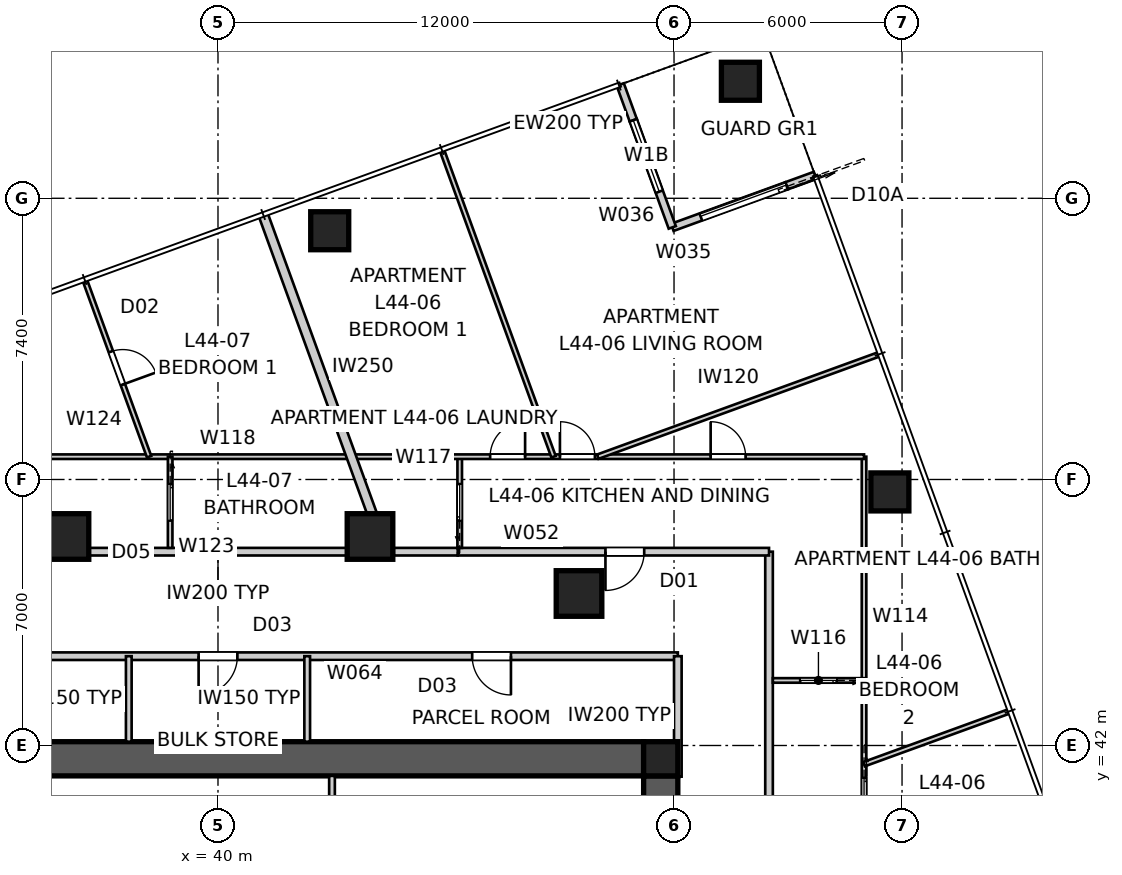
"""IFC4 building model, lengths in metres.
Left out: names, types, materials, properties, quantities, classifications, styles, units other than length and angle.
Written with IfcOpenShell. Run it as: python <this file> out.ifc"""

import sys

from ifc_helpers import new_model, si_unit, direction, frame, frame_2d, origin, origin_2d, place, context, subcontext, project, spatial, polyline, rectangle, outline, extrude, element, fill, save


model = new_model("IFC4")
c1 = context("Model", 3, precision=1e-05, world=origin(), true_north=direction((0.0, 1.0)))
c2 = subcontext(c1, "Body", "Model", "MODEL_VIEW")
j1 = project(units=[si_unit("LENGTHUNIT", "METRE"), si_unit("PLANEANGLEUNIT", "RADIAN")], contexts=[c1])
p1 = place(None, origin())
s1 = spatial("IfcSite", under=j1, at=p1, CompositionType="ELEMENT")
p2 = place(p1, origin())
s2 = spatial("IfcBuilding", under=s1, at=p2, CompositionType="ELEMENT")
p3 = place(p2, frame((0.0, 0.0, 160.8)))
s3 = spatial("IfcBuildingStorey", under=s2, at=p3, CompositionType="ELEMENT", Elevation=160.8)
p4 = place(p3, frame((28.8, 41.65, 0.0), z_axis=(0.0, 0.0, 1.0), x_axis=(1.0, 0.0, 0.0)))
e1 = element("IfcWall", 1, at=p4, inside=s3, PredefinedType="SHEAR", context=c2, shape_type="SweptSolid", body=[
    extrude(outline(polyline([(0.0, -0.45), (22.4, -0.45), (22.4, -0.025), (22.85, -0.025), (22.85, 0.025), (22.4, 0.025), (22.4, 0.45), (0.0, 0.45), (0.0, 0.025), (-0.45, 0.025), (-0.45, -0.025), (0.0, -0.025), (0.0, -0.45)])), origin(), (0.0, 0.0, 1.0), 3.4),
])
p5 = place(p3, frame((51.65, 18.8, 0.0), z_axis=(0.0, 0.0, 1.0), x_axis=(0.0, 1.0, 0.0)))
e2 = element("IfcWall", 2, at=p5, inside=s3, PredefinedType="SHEAR", context=c2, shape_type="SweptSolid", body=[
    extrude(outline(polyline([(0.0, -0.45), (22.4, -0.45), (22.4, -0.025), (22.85, -0.025), (22.85, 0.025), (22.4, 0.025), (22.4, 0.45), (0.0, 0.45), (0.0, 0.025), (-0.45, 0.025), (-0.45, -0.025), (0.0, -0.025), (0.0, -0.45)])), origin(), (0.0, 0.0, 1.0), 3.4),
])
p6 = place(p5, frame((11.14, 0.0, 0.0)))
e3 = element("IfcOpeningElement", 3, at=p6, cuts=e2, PredefinedType="OPENING", context=c2, shape_type="SweptSolid", body=[
    extrude(rectangle(XDim=1.02, YDim=2.4, at=frame_2d((0.51, 1.2))), frame((0.0, 0.46, 0.0), z_axis=(0.0, -1.0, 0.0), x_axis=(1.0, 0.0, 0.0)), (0.0, 0.0, 1.0), 0.92),
])
p7 = place(p3, frame((51.65, 41.65, 0.0), z_axis=(0.0, 0.0, 1.0), x_axis=(1.0, 0.0, 0.0)))
e4 = element("IfcColumn", 4, at=p7, inside=s3, PredefinedType="COLUMN", context=c2, shape_type="SweptSolid", body=[
    extrude(rectangle(XDim=0.9, YDim=0.9, at=origin_2d()), origin(), (0.0, 0.0, 1.0), 3.4),
])
for number, where, z_axis, x_axis in (
    (5, (57.68, 48.673, 0.0), (0.0, 0.0, 1.0), (1.0, 0.0, 0.0)),
    (6, (53.747, 59.479, 0.0), (0.0, 0.0, 1.0), (1.0, 0.0, 0.0)),
    (7, (42.94, 55.546, 0.0), (0.0, 0.0, 1.0), (1.0, 0.0, 0.0)),
):
    element("IfcColumn", number, at=place(p3, frame(where, z_axis=z_axis, x_axis=x_axis)), inside=s3, PredefinedType="COLUMN", context=c2, shape_type="SweptSolid", body=[
        extrude(rectangle(XDim=1.0, YDim=1.0, at=origin_2d()), origin(), (0.0, 0.0, 1.0), 3.4),
    ])
for number, where, z_axis, x_axis in (
    (8, (49.5, 46.0, 0.0), (0.0, 0.0, 1.0), (1.0, 0.0, 0.0)),
    (9, (44.0, 47.5, 0.0), (0.0, 0.0, 1.0), (1.0, 0.0, 0.0)),
    (10, (36.0, 47.5, 0.0), (0.0, 0.0, 1.0), (1.0, 0.0, 0.0)),
):
    element("IfcColumn", number, at=place(p3, frame(where, z_axis=z_axis, x_axis=x_axis)), inside=s3, PredefinedType="COLUMN", context=c2, shape_type="SweptSolid", body=[
        extrude(rectangle(XDim=1.2, YDim=1.2, at=origin_2d()), origin(), (0.0, 0.0, 1.0), 3.4),
    ])
p8 = place(p3, frame((55.712, 57.002, 0.0), z_axis=(0.0, 0.0, 1.0), x_axis=(-0.939659694648, -0.342110593602, 0.0)))
e11 = element("IfcWall", 11, at=p8, inside=s3, PredefinedType="SOLIDWALL", context=c2, shape_type="SweptSolid", body=[
    extrude(rectangle(XDim=0.8, YDim=0.2, at=frame_2d((0.4, 0.0))), origin(), (0.0, 0.0, 1.0), 3.25),
])
p9 = place(p3, frame((54.96, 56.729, 0.0), z_axis=(0.0, 0.0, 1.0), x_axis=(-0.939693144909, -0.342018703306, 0.0)))
e12 = element("IfcWall", 12, at=p9, inside=s3, PredefinedType="SOLIDWALL", context=c2, shape_type="SweptSolid", body=[
    extrude(rectangle(XDim=3.2, YDim=0.2, at=frame_2d((1.6, 0.0))), origin(), (0.0, 0.0, 1.0), 2.722),
])
p10 = place(p9, origin())
e13 = element("IfcOpeningElement", 13, at=p10, cuts=e12, PredefinedType="OPENING", context=c2, shape_type="SweptSolid", body=[
    extrude(rectangle(XDim=2.4, YDim=2.1, at=frame_2d((1.2, 1.05))), frame((0.0, 0.11, 0.0), z_axis=(0.0, -1.0, 0.0), x_axis=(1.0, 0.0, 0.0)), (0.0, 0.0, 1.0), 0.22),
])
p11 = place(p3, frame((51.953, 55.634, 0.0), z_axis=(0.0, 0.0, 1.0), x_axis=(-0.341965219194, 0.939712609717, 0.0)))
e14 = element("IfcWall", 14, at=p11, inside=s3, PredefinedType="SOLIDWALL", context=c2, shape_type="SweptSolid", body=[
    extrude(rectangle(XDim=3.0, YDim=0.2, at=frame_2d((1.5, 0.0))), origin(), (0.0, 0.0, 1.0), 2.722),
])
p12 = place(p11, frame((1.0, 0.0, 0.45)))
e15 = element("IfcOpeningElement", 15, at=p12, cuts=e14, PredefinedType="OPENING", context=c2, shape_type="SweptSolid", body=[
    extrude(rectangle(XDim=2.0, YDim=1.8, at=frame_2d((1.0, 0.9))), frame((0.0, 0.11, 0.0), z_axis=(0.0, -1.0, 0.0), x_axis=(1.0, 0.0, 0.0)), (0.0, 0.0, 1.0), 0.22),
])
p13 = place(p3, frame((50.927, 58.453, 0.0), z_axis=(0.0, 0.0, 1.0), x_axis=(-0.342037080957, 0.939686455819, 0.0)))
e16 = element("IfcWall", 16, at=p13, inside=s3, PredefinedType="SOLIDWALL", context=c2, shape_type="SweptSolid", body=[
    extrude(rectangle(XDim=1.0, YDim=0.2, at=frame_2d((0.5, 0.0))), origin(), (0.0, 0.0, 1.0), 3.25),
])
p14 = place(p3, frame((54.5, 13.7, 0.0), z_axis=(0.0, 0.0, 1.0), x_axis=(0.0, 1.0, 0.0)))
e17 = element("IfcWall", 17, at=p14, inside=s3, PredefinedType="PARTITIONING", context=c2, shape_type="SweptSolid", body=[
    extrude(rectangle(XDim=33.4, YDim=0.2, at=frame_2d((16.7, 0.0))), origin(), (0.0, 0.0, 1.0), 3.25),
])
p15 = place(p14, frame((5.028, 0.0, 0.0)))
e18 = element("IfcOpeningElement", 18, at=p15, cuts=e17, PredefinedType="OPENING", context=c2, shape_type="SweptSolid", body=[
    extrude(rectangle(XDim=1.02, YDim=2.1, at=frame_2d((0.51, 1.05))), frame((0.0, 0.11, 0.0), z_axis=(0.0, -1.0, 0.0), x_axis=(1.0, 0.0, 0.0)), (0.0, 0.0, 1.0), 0.22),
])
p16 = place(p14, frame((13.587, 0.0, 0.0)))
e19 = element("IfcOpeningElement", 19, at=p16, cuts=e17, PredefinedType="OPENING", context=c2, shape_type="SweptSolid", body=[
    extrude(rectangle(XDim=1.02, YDim=2.34, at=frame_2d((0.51, 1.17))), frame((0.0, 0.11, 0.0), z_axis=(0.0, -1.0, 0.0), x_axis=(1.0, 0.0, 0.0)), (0.0, 0.0, 1.0), 0.22),
])
p17 = place(p3, frame((54.5, 47.1, 0.0), z_axis=(0.0, 0.0, 1.0), x_axis=(-1.0, 0.0, 0.0)))
e20 = element("IfcWall", 20, at=p17, inside=s3, PredefinedType="PARTITIONING", context=c2, shape_type="SweptSolid", body=[
    extrude(rectangle(XDim=8.192, YDim=0.2, at=frame_2d((4.096, 0.0))), origin(), (0.0, 0.0, 1.0), 3.25),
])
p18 = place(p17, frame((3.285, 0.0, 0.0)))
e21 = element("IfcOpeningElement", 21, at=p18, cuts=e20, PredefinedType="OPENING", context=c2, shape_type="SweptSolid", body=[
    extrude(rectangle(XDim=1.02, YDim=2.34, at=frame_2d((0.51, 1.17))), frame((0.0, 0.11, 0.0), z_axis=(0.0, -1.0, 0.0), x_axis=(1.0, 0.0, 0.0)), (0.0, 0.0, 1.0), 0.22),
])
p19 = place(p3, frame((46.308, 47.1, 0.0), z_axis=(0.0, 0.0, 1.0), x_axis=(-1.0, 0.0, 0.0)))
e22 = element("IfcWall", 22, at=p19, inside=s3, PredefinedType="PARTITIONING", context=c2, shape_type="SweptSolid", body=[
    extrude(rectangle(XDim=1.683, YDim=0.2, at=frame_2d((0.842, 0.0))), origin(), (0.0, 0.0, 1.0), 2.55),
])
p20 = place(p3, frame((44.625, 47.1, 0.0), z_axis=(0.0, 0.0, 1.0), x_axis=(-1.0, 0.0, 0.0)))
e23 = element("IfcWall", 23, at=p20, inside=s3, PredefinedType="PARTITIONING", context=c2, shape_type="SweptSolid", body=[
    extrude(rectangle(XDim=9.25, YDim=0.2, at=frame_2d((4.625, 0.0))), origin(), (0.0, 0.0, 1.0), 3.25),
])
p21 = place(p3, frame((41.188, 55.973, 0.0), z_axis=(0.0, 0.0, 1.0), x_axis=(0.342014066156, -0.939694832673, 0.0)))
e24 = element("IfcWall", 24, at=p21, inside=s3, PredefinedType="PARTITIONING", context=c2, shape_type="SweptSolid", body=[
    extrude(rectangle(XDim=9.331, YDim=0.25, at=frame_2d((4.665, 0.0))), origin(), (0.0, 0.0, 1.0), 3.25),
])
p22 = place(p3, frame((43.0, 41.2, 0.0), z_axis=(0.0, 0.0, 1.0), x_axis=(0.0, -1.0, 0.0)))
e25 = element("IfcWall", 25, at=p22, inside=s3, PredefinedType="SOLIDWALL", context=c2, shape_type="SweptSolid", body=[
    extrude(rectangle(XDim=5.9, YDim=0.15, at=frame_2d((2.95, 0.0))), origin(), (0.0, 0.0, 1.0), 3.25),
])
p23 = place(p3, frame((52.1, 44.35, 0.0), z_axis=(0.0, 0.0, 1.0), x_axis=(-1.0, 0.0, 0.0)))
e26 = element("IfcWall", 26, at=p23, inside=s3, PredefinedType="PARTITIONING", context=c2, shape_type="SweptSolid", body=[
    extrude(rectangle(XDim=24.2, YDim=0.2, at=frame_2d((12.1, 0.0))), origin(), (0.0, 0.0, 1.0), 3.25),
])
p24 = place(p23, frame((18.789, 0.0, 0.0)))
e27 = element("IfcOpeningElement", 27, at=p24, cuts=e26, PredefinedType="OPENING", context=c2, shape_type="SweptSolid", body=[
    extrude(rectangle(XDim=1.02, YDim=2.1, at=frame_2d((0.51, 1.05))), frame((0.0, 0.11, 0.0), z_axis=(0.0, -1.0, 0.0), x_axis=(1.0, 0.0, 0.0)), (0.0, 0.0, 1.0), 0.22),
])
p25 = place(p23, frame((4.391, 0.0, 0.0)))
e28 = element("IfcOpeningElement", 28, at=p25, cuts=e26, PredefinedType="OPENING", context=c2, shape_type="SweptSolid", body=[
    extrude(rectangle(XDim=1.02, YDim=2.1, at=frame_2d((0.51, 1.05))), frame((0.0, 0.11, 0.0), z_axis=(0.0, -1.0, 0.0), x_axis=(1.0, 0.0, 0.0)), (0.0, 0.0, 1.0), 0.22),
])
p26 = place(p23, frame((11.59, 0.0, 0.0)))
e29 = element("IfcOpeningElement", 29, at=p26, cuts=e26, PredefinedType="OPENING", context=c2, shape_type="SweptSolid", body=[
    extrude(rectangle(XDim=1.02, YDim=2.1, at=frame_2d((0.51, 1.05))), frame((0.0, 0.11, 0.0), z_axis=(0.0, -1.0, 0.0), x_axis=(1.0, 0.0, 0.0)), (0.0, 0.0, 1.0), 0.22),
])
p27 = place(p3, frame((52.1, 41.18, 0.0), z_axis=(0.0, 0.0, 1.0), x_axis=(0.0, 1.0, 0.0)))
e30 = element("IfcWall", 30, at=p27, inside=s3, PredefinedType="PARTITIONING", context=c2, shape_type="SweptSolid", body=[
    extrude(rectangle(XDim=3.17, YDim=0.2, at=frame_2d((1.585, 0.0))), origin(), (0.0, 0.0, 1.0), 3.25),
])
for number, where, z_axis, x_axis in (
    (31, (37.653, 42.1, 0.0), (0.0, 0.0, 1.0), (0.0, 1.0, 0.0)),
    (32, (42.347, 42.1, 0.0), (0.0, 0.0, 1.0), (0.0, 1.0, 0.0)),
):
    element("IfcWall", number, at=place(p3, frame(where, z_axis=z_axis, x_axis=x_axis)), inside=s3, PredefinedType="SOLIDWALL", context=c2, shape_type="SweptSolid", body=[
        extrude(rectangle(XDim=2.25, YDim=0.15, at=frame_2d((1.125, 0.0))), origin(), (0.0, 0.0, 1.0), 3.25),
    ])
p28 = place(p3, frame((57.0, 49.6, 0.0), z_axis=(0.0, 0.0, 1.0), x_axis=(0.0, -1.0, 0.0)))
e33 = element("IfcWall", 33, at=p28, inside=s3, PredefinedType="PARTITIONING", context=c2, shape_type="SweptSolid", body=[
    extrude(rectangle(XDim=18.589, YDim=0.12, at=frame_2d((9.294, 0.0))), origin(), (0.0, 0.0, 1.0), 2.55),
])
p29 = place(p28, frame((8.452, 0.0, 0.0)))
e34 = element("IfcOpeningElement", 34, at=p29, cuts=e33, PredefinedType="OPENING", context=c2, shape_type="SweptSolid", body=[
    extrude(rectangle(XDim=0.96, YDim=2.1, at=frame_2d((0.48, 1.05))), frame((0.0, 0.07, 0.0), z_axis=(0.0, -1.0, 0.0), x_axis=(1.0, 0.0, 0.0)), (0.0, 0.0, 1.0), 0.14),
])
p30 = place(p28, frame((11.889, 0.0, 0.0)))
e35 = element("IfcOpeningElement", 35, at=p30, cuts=e33, PredefinedType="OPENING", context=c2, shape_type="SweptSolid", body=[
    extrude(rectangle(XDim=0.96, YDim=2.1, at=frame_2d((0.48, 1.05))), frame((0.0, 0.07, 0.0), z_axis=(0.0, -1.0, 0.0), x_axis=(1.0, 0.0, 0.0)), (0.0, 0.0, 1.0), 0.14),
])
p31 = place(p3, frame((57.0, 43.712, 0.0), z_axis=(0.0, 0.0, 1.0), x_axis=(-1.0, 0.0, 0.0)))
e36 = element("IfcWall", 36, at=p31, inside=s3, PredefinedType="PARTITIONING", context=c2, shape_type="SweptSolid", body=[
    extrude(rectangle(XDim=2.4, YDim=0.12, at=frame_2d((1.2, 0.0))), origin(), (0.0, 0.0, 1.0), 3.25),
])
p32 = place(p31, frame((0.72, 0.0, 0.0)))
e37 = element("IfcOpeningElement", 37, at=p32, cuts=e36, PredefinedType="OPENING", context=c2, shape_type="SweptSolid", body=[
    extrude(rectangle(XDim=0.96, YDim=2.1, at=frame_2d((0.48, 1.05))), frame((0.0, 0.07, 0.0), z_axis=(0.0, -1.0, 0.0), x_axis=(1.0, 0.0, 0.0)), (0.0, 0.0, 1.0), 0.14),
])
p33 = place(p3, frame((46.361, 47.2, 0.0), z_axis=(0.0, 0.0, 1.0), x_axis=(0.0, 1.0, 0.0)))
e38 = element("IfcWall", 38, at=p33, inside=s3, PredefinedType="PARTITIONING", context=c2, shape_type="SweptSolid", body=[
    extrude(rectangle(XDim=2.4, YDim=0.12, at=frame_2d((1.2, 0.0))), origin(), (0.0, 0.0, 1.0), 3.25),
])
p34 = place(p33, frame((0.72, 0.0, 0.0)))
e39 = element("IfcOpeningElement", 39, at=p34, cuts=e38, PredefinedType="OPENING", context=c2, shape_type="SweptSolid", body=[
    extrude(rectangle(XDim=0.96, YDim=2.1, at=frame_2d((0.48, 1.05))), frame((0.0, 0.07, 0.0), z_axis=(0.0, -1.0, 0.0), x_axis=(1.0, 0.0, 0.0)), (0.0, 0.0, 1.0), 0.14),
])
p35 = place(p3, frame((27.545, 49.6, 0.0), z_axis=(0.0, 0.0, 1.0), x_axis=(1.0, 0.0, 0.0)))
e40 = element("IfcWall", 40, at=p35, inside=s3, PredefinedType="PARTITIONING", context=c2, shape_type="SweptSolid", body=[
    extrude(rectangle(XDim=29.455, YDim=0.12, at=frame_2d((14.727, 0.0))), origin(), (0.0, 0.0, 1.0), 3.25),
])
p36 = place(p35, frame((4.887, 0.0, 0.0)))
e41 = element("IfcOpeningElement", 41, at=p36, cuts=e40, PredefinedType="OPENING", context=c2, shape_type="SweptSolid", body=[
    extrude(rectangle(XDim=0.92, YDim=2.34, at=frame_2d((0.46, 1.17))), frame((0.0, 0.07, 0.0), z_axis=(0.0, -1.0, 0.0), x_axis=(1.0, 0.0, 0.0)), (0.0, 0.0, 1.0), 0.14),
])
p37 = place(p35, frame((25.418, 0.0, 0.0)))
e42 = element("IfcOpeningElement", 42, at=p37, cuts=e40, PredefinedType="OPENING", context=c2, shape_type="SweptSolid", body=[
    extrude(rectangle(XDim=0.92, YDim=2.34, at=frame_2d((0.46, 1.17))), frame((0.0, 0.07, 0.0), z_axis=(0.0, -1.0, 0.0), x_axis=(1.0, 0.0, 0.0)), (0.0, 0.0, 1.0), 0.14),
])
p38 = place(p35, frame((19.616, 0.0, 0.0)))
e43 = element("IfcOpeningElement", 43, at=p38, cuts=e40, PredefinedType="OPENING", context=c2, shape_type="SweptSolid", body=[
    extrude(rectangle(XDim=0.92, YDim=2.34, at=frame_2d((0.46, 1.17))), frame((0.0, 0.07, 0.0), z_axis=(0.0, -1.0, 0.0), x_axis=(1.0, 0.0, 0.0)), (0.0, 0.0, 1.0), 0.14),
])
p39 = place(p35, frame((21.452, 0.0, 0.0)))
e44 = element("IfcOpeningElement", 44, at=p39, cuts=e40, PredefinedType="OPENING", context=c2, shape_type="SweptSolid", body=[
    extrude(rectangle(XDim=0.92, YDim=2.34, at=frame_2d((0.46, 1.17))), frame((0.0, 0.07, 0.0), z_axis=(0.0, -1.0, 0.0), x_axis=(1.0, 0.0, 0.0)), (0.0, 0.0, 1.0), 0.14),
])
p40 = place(p3, frame((48.829, 49.6, 0.0), z_axis=(0.0, 0.0, 1.0), x_axis=(-0.34202238111, 0.939691806296, 0.0)))
e45 = element("IfcWall", 45, at=p40, inside=s3, PredefinedType="PARTITIONING", context=c2, shape_type="SweptSolid", body=[
    extrude(rectangle(XDim=8.562, YDim=0.12, at=frame_2d((4.281, 0.0))), origin(), (0.0, 0.0, 1.0), 3.25),
])
p41 = place(p3, frame((57.385, 52.29, 0.0), z_axis=(0.0, 0.0, 1.0), x_axis=(-0.939694604347, -0.342014693486, 0.0)))
e46 = element("IfcWall", 46, at=p41, inside=s3, PredefinedType="PARTITIONING", context=c2, shape_type="SweptSolid", body=[
    extrude(rectangle(XDim=7.866, YDim=0.12, at=frame_2d((3.933, 0.0))), origin(), (0.0, 0.0, 1.0), 3.25),
])
p42 = place(p3, frame((60.805, 42.893, 0.0), z_axis=(0.0, 0.0, 1.0), x_axis=(-0.939682468191, -0.342048036063, 0.0)))
e47 = element("IfcWall", 47, at=p42, inside=s3, PredefinedType="PARTITIONING", context=c2, shape_type="SweptSolid", body=[
    extrude(rectangle(XDim=4.049, YDim=0.12, at=frame_2d((2.024, 0.0))), origin(), (0.0, 0.0, 1.0), 3.25),
])
p43 = place(p3, frame((38.741, 49.6, 0.0), z_axis=(0.0, 0.0, 1.0), x_axis=(0.0, -1.0, 0.0)))
e48 = element("IfcWall", 48, at=p43, inside=s3, PredefinedType="PARTITIONING", context=c2, shape_type="SweptSolid", body=[
    extrude(rectangle(XDim=2.4, YDim=0.12, at=frame_2d((1.2, 0.0))), origin(), (0.0, 0.0, 1.0), 3.25),
])
p44 = place(p43, frame((0.72, 0.0, 0.0)))
e49 = element("IfcOpeningElement", 49, at=p44, cuts=e48, PredefinedType="OPENING", context=c2, shape_type="SweptSolid", body=[
    extrude(rectangle(XDim=0.96, YDim=2.1, at=frame_2d((0.48, 1.05))), frame((0.0, 0.07, 0.0), z_axis=(0.0, -1.0, 0.0), x_axis=(1.0, 0.0, 0.0)), (0.0, 0.0, 1.0), 0.14),
])
p45 = place(p3, frame((36.504, 54.225, 0.0), z_axis=(0.0, 0.0, 1.0), x_axis=(0.342017860496, -0.939693451665, 0.0)))
e50 = element("IfcWall", 50, at=p45, inside=s3, PredefinedType="PARTITIONING", context=c2, shape_type="SweptSolid", body=[
    extrude(rectangle(XDim=4.922, YDim=0.12, at=frame_2d((2.461, 0.0))), origin(), (0.0, 0.0, 1.0), 3.25),
])
p46 = place(p45, frame((1.981, 0.0, 0.0)))
e51 = element("IfcOpeningElement", 51, at=p46, cuts=e50, PredefinedType="OPENING", context=c2, shape_type="SweptSolid", body=[
    extrude(rectangle(XDim=0.92, YDim=2.34, at=frame_2d((0.46, 1.17))), frame((0.0, 0.07, 0.0), z_axis=(0.0, -1.0, 0.0), x_axis=(1.0, 0.0, 0.0)), (0.0, 0.0, 1.0), 0.14),
])
p47 = place(p10, origin())
e52 = element("IfcDoor", 52, at=p47, inside=s3, OperationType="SLIDING_TO_LEFT", PredefinedType="DOOR", context=c2, shape_type="SweptSolid", body=[
    extrude(rectangle(XDim=2.4, YDim=2.1, at=frame_2d((1.2, 1.05))), frame((0.0, 0.025, 0.0), z_axis=(0.0, -1.0, 0.0), x_axis=(1.0, 0.0, 0.0)), (0.0, 0.0, 1.0), 0.05),
])
fill(e13, e52)
p48 = place(p12, origin())
e53 = element("IfcWindow", 53, at=p48, inside=s3, PartitioningType="SINGLE_PANEL", PredefinedType="WINDOW", context=c2, shape_type="SweptSolid", body=[
    extrude(rectangle(XDim=2.0, YDim=1.8, at=frame_2d((1.0, 0.9))), frame((0.0, 0.03, 0.0), z_axis=(0.0, -1.0, 0.0), x_axis=(1.0, 0.0, 0.0)), (0.0, 0.0, 1.0), 0.06),
])
fill(e15, e53)
p49 = place(p25, origin())
e54 = element("IfcDoor", 54, at=p49, inside=s3, OperationType="SINGLE_SWING_LEFT", PredefinedType="DOOR", context=c2, shape_type="SweptSolid", body=[
    extrude(rectangle(XDim=1.02, YDim=2.1, at=frame_2d((0.51, 1.05))), frame((0.0, 0.025, 0.0), z_axis=(0.0, -1.0, 0.0), x_axis=(1.0, 0.0, 0.0)), (0.0, 0.0, 1.0), 0.05),
])
fill(e28, e54)
p50 = place(p18, origin())
e55 = element("IfcDoor", 55, at=p50, inside=s3, OperationType="SINGLE_SWING_RIGHT", PredefinedType="DOOR", context=c2, shape_type="SweptSolid", body=[
    extrude(rectangle(XDim=1.02, YDim=2.34, at=frame_2d((0.51, 1.17))), frame((0.0, 0.025, 0.0), z_axis=(0.0, -1.0, 0.0), x_axis=(1.0, 0.0, 0.0)), (0.0, 0.0, 1.0), 0.05),
])
fill(e21, e55)
p51 = place(p26, origin())
e56 = element("IfcDoor", 56, at=p51, inside=s3, OperationType="SINGLE_SWING_RIGHT", PredefinedType="DOOR", context=c2, shape_type="SweptSolid", body=[
    extrude(rectangle(XDim=1.02, YDim=2.1, at=frame_2d((0.51, 1.05))), frame((0.0, 0.025, 0.0), z_axis=(0.0, -1.0, 0.0), x_axis=(1.0, 0.0, 0.0)), (0.0, 0.0, 1.0), 0.05),
])
fill(e29, e56)
p52 = place(p44, origin())
e57 = element("IfcDoor", 57, at=p52, inside=s3, OperationType="SLIDING_TO_LEFT", PredefinedType="DOOR", context=c2, shape_type="SweptSolid", body=[
    extrude(rectangle(XDim=0.96, YDim=2.1, at=frame_2d((0.48, 1.05))), frame((0.0, 0.025, 0.0), z_axis=(0.0, -1.0, 0.0), x_axis=(1.0, 0.0, 0.0)), (0.0, 0.0, 1.0), 0.05),
])
fill(e49, e57)
p53 = place(p37, origin())
e58 = element("IfcDoor", 58, at=p53, inside=s3, OperationType="SINGLE_SWING_LEFT", PredefinedType="DOOR", context=c2, shape_type="SweptSolid", body=[
    extrude(rectangle(XDim=0.92, YDim=2.34, at=frame_2d((0.46, 1.17))), frame((0.0, 0.025, 0.0), z_axis=(0.0, -1.0, 0.0), x_axis=(1.0, 0.0, 0.0)), (0.0, 0.0, 1.0), 0.05),
])
fill(e42, e58)
p54 = place(p38, origin())
e59 = element("IfcDoor", 59, at=p54, inside=s3, OperationType="SINGLE_SWING_RIGHT", PredefinedType="DOOR", context=c2, shape_type="SweptSolid", body=[
    extrude(rectangle(XDim=0.92, YDim=2.34, at=frame_2d((0.46, 1.17))), frame((0.0, 0.025, 0.0), z_axis=(0.0, -1.0, 0.0), x_axis=(1.0, 0.0, 0.0)), (0.0, 0.0, 1.0), 0.05),
])
fill(e43, e59)
p55 = place(p32, origin())
e60 = element("IfcDoor", 60, at=p55, inside=s3, OperationType="SLIDING_TO_LEFT", PredefinedType="DOOR", context=c2, shape_type="SweptSolid", body=[
    extrude(rectangle(XDim=0.96, YDim=2.1, at=frame_2d((0.48, 1.05))), frame((0.0, 0.025, 0.0), z_axis=(0.0, -1.0, 0.0), x_axis=(1.0, 0.0, 0.0)), (0.0, 0.0, 1.0), 0.05),
])
fill(e37, e60)
p56 = place(p34, origin())
e61 = element("IfcDoor", 61, at=p56, inside=s3, OperationType="SLIDING_TO_LEFT", PredefinedType="DOOR", context=c2, shape_type="SweptSolid", body=[
    extrude(rectangle(XDim=0.96, YDim=2.1, at=frame_2d((0.48, 1.05))), frame((0.0, 0.025, 0.0), z_axis=(0.0, -1.0, 0.0), x_axis=(1.0, 0.0, 0.0)), (0.0, 0.0, 1.0), 0.05),
])
fill(e39, e61)
p57 = place(p39, origin())
e62 = element("IfcDoor", 62, at=p57, inside=s3, OperationType="SINGLE_SWING_LEFT", PredefinedType="DOOR", context=c2, shape_type="SweptSolid", body=[
    extrude(rectangle(XDim=0.92, YDim=2.34, at=frame_2d((0.46, 1.17))), frame((0.0, 0.025, 0.0), z_axis=(0.0, -1.0, 0.0), x_axis=(1.0, 0.0, 0.0)), (0.0, 0.0, 1.0), 0.05),
])
fill(e44, e62)
p58 = place(p46, origin())
e63 = element("IfcDoor", 63, at=p58, inside=s3, OperationType="SINGLE_SWING_RIGHT", PredefinedType="DOOR", context=c2, shape_type="SweptSolid", body=[
    extrude(rectangle(XDim=0.92, YDim=2.34, at=frame_2d((0.46, 1.17))), frame((0.0, 0.025, 0.0), z_axis=(0.0, -1.0, 0.0), x_axis=(1.0, 0.0, 0.0)), (0.0, 0.0, 1.0), 0.05),
])
fill(e51, e63)
p59 = place(p29, origin())
e64 = element("IfcDoor", 64, at=p59, inside=s3, OperationType="SLIDING_TO_LEFT", PredefinedType="DOOR", context=c2, shape_type="SweptSolid", body=[
    extrude(rectangle(XDim=0.96, YDim=2.1, at=frame_2d((0.48, 1.05))), frame((0.0, 0.025, 0.0), z_axis=(0.0, -1.0, 0.0), x_axis=(1.0, 0.0, 0.0)), (0.0, 0.0, 1.0), 0.05),
])
fill(e34, e64)
save(model, sys.argv[1])
